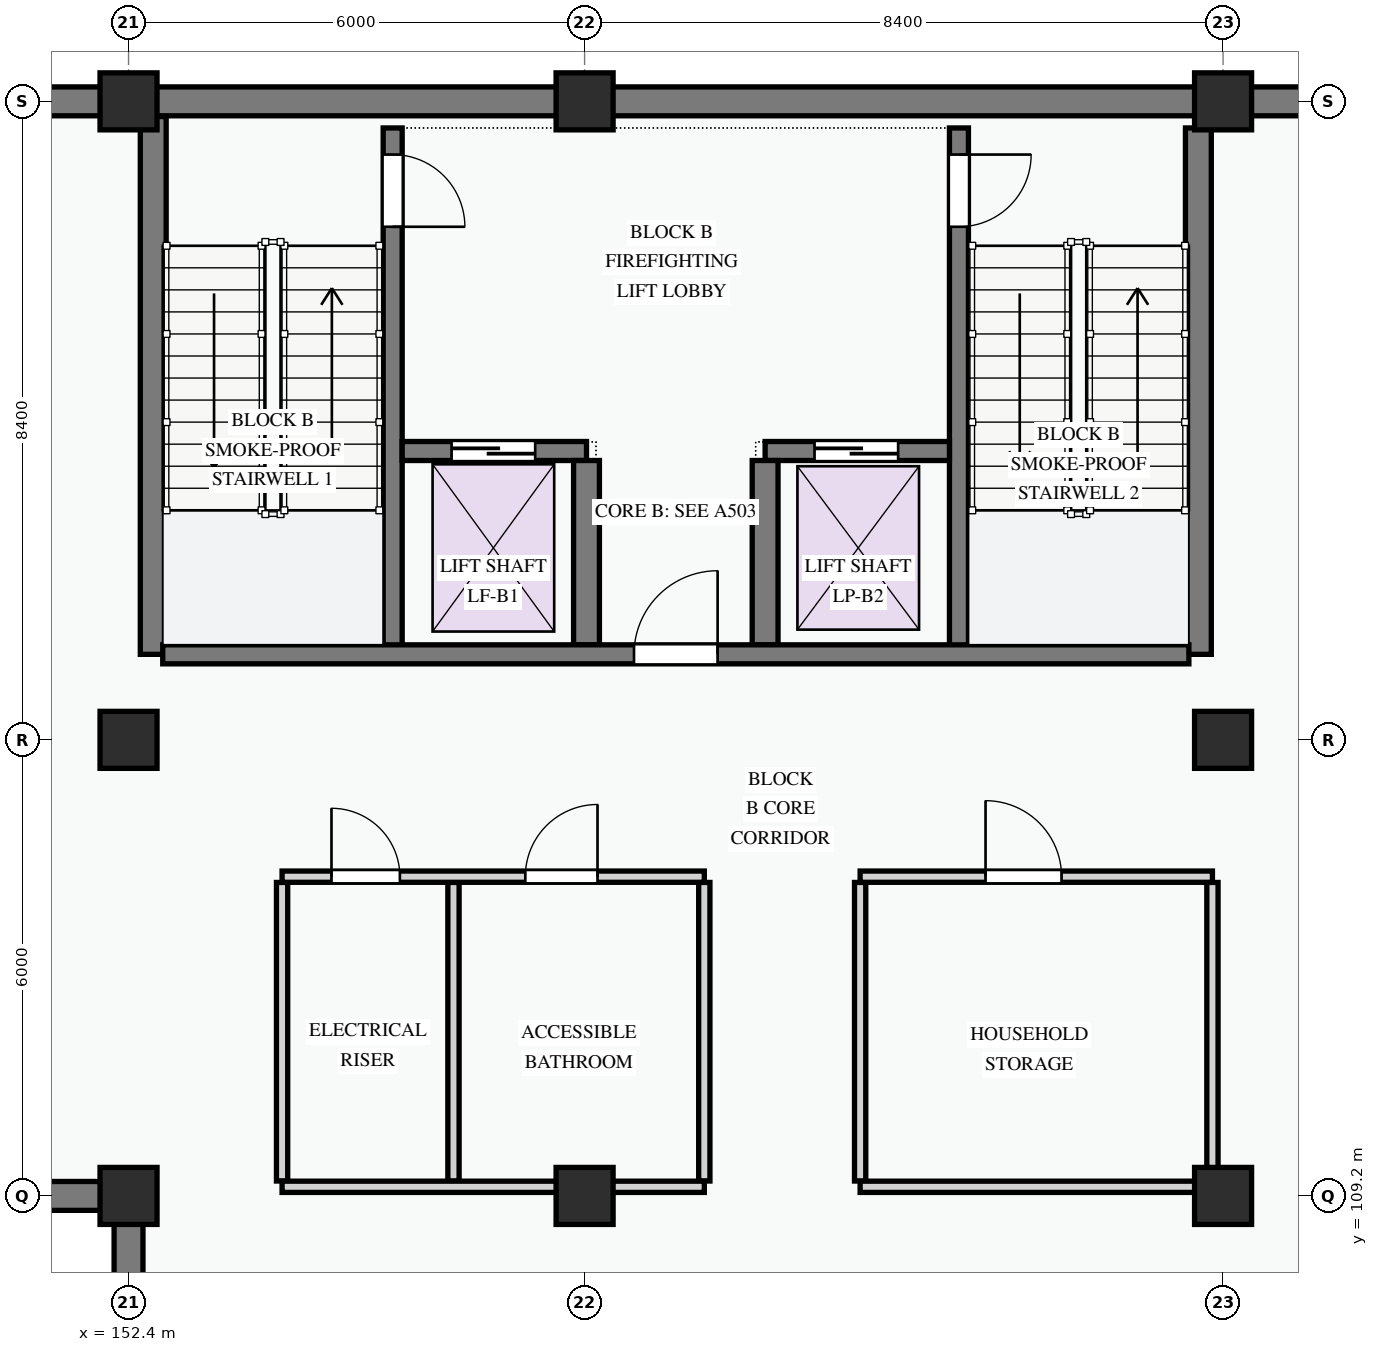
"""IFC4 building model, lengths in metres.
Left out: names, types, materials, properties, quantities, classifications, styles, units other than length and angle.
Written with IfcOpenShell. Run it as: python <this file> out.ifc"""

import sys

from ifc_helpers import new_model, si_unit, direction, frame, frame_2d, origin, origin_2d, place, context, subcontext, project, spatial, rectangle, extrude, element, fill, save


model = new_model("IFC4")
c1 = context("Model", 3, precision=1e-05, world=origin(), true_north=direction((0.0, 1.0)))
c2 = subcontext(c1, "Body", "Model", "MODEL_VIEW")
j1 = project(units=[si_unit("LENGTHUNIT", "METRE"), si_unit("PLANEANGLEUNIT", "RADIAN")], contexts=[c1])
p1 = place(None, origin())
s1 = spatial("IfcSite", under=j1, at=p1, CompositionType="ELEMENT")
p2 = place(p1, origin())
s2 = spatial("IfcBuilding", under=s1, at=p2, CompositionType="ELEMENT")
p3 = place(p2, frame((0.0, 0.0, -4.2)))
s3 = spatial("IfcBuildingStorey", under=s2, at=p3, CompositionType="ELEMENT", Elevation=-4.2)
for number, where, z_axis, x_axis in (
    (1, (152.4, 109.2, -0.45), (0.0, 0.0, 1.0), (1.0, 0.0, 0.0)),
    (2, (152.4, 115.2, -0.45), (0.0, 0.0, 1.0), (1.0, 0.0, 0.0)),
    (3, (152.4, 123.6, -0.45), (0.0, 0.0, 1.0), (1.0, 0.0, 0.0)),
    (4, (158.4, 109.2, -0.45), (0.0, 0.0, 1.0), (1.0, 0.0, 0.0)),
    (5, (158.4, 123.6, -0.45), (0.0, 0.0, 1.0), (1.0, 0.0, 0.0)),
    (6, (166.8, 109.2, -0.45), (0.0, 0.0, 1.0), (1.0, 0.0, 0.0)),
    (7, (166.8, 115.2, -0.45), (0.0, 0.0, 1.0), (1.0, 0.0, 0.0)),
    (8, (166.8, 123.6, -0.45), (0.0, 0.0, 1.0), (1.0, 0.0, 0.0)),
):
    element("IfcColumn", number, at=place(p3, frame(where, z_axis=z_axis, x_axis=x_axis)), inside=s3, PredefinedType="COLUMN", context=c2, shape_type="SweptSolid", body=[
        extrude(rectangle(XDim=0.75, YDim=0.75, at=origin_2d()), origin(), (0.0, 0.0, 1.0), 4.65),
    ])
p4 = place(p3, frame((174.0, 123.6, 0.0), z_axis=(0.0, 0.0, 1.0), x_axis=(-1.0, 0.0, 0.0)))
e9 = element("IfcWall", 9, at=p4, inside=s3, PredefinedType="SHEAR", context=c2, shape_type="SweptSolid", body=[
    extrude(rectangle(XDim=93.6, YDim=0.38, at=frame_2d((46.8, 0.0))), origin(), (0.0, 0.0, 1.0), 3.9),
])
p5 = place(p3, frame((80.4, 109.2, 0.0), z_axis=(0.0, 0.0, 1.0), x_axis=(1.0, 0.0, 0.0)))
e10 = element("IfcWall", 10, at=p5, inside=s3, PredefinedType="SHEAR", context=c2, shape_type="SweptSolid", body=[
    extrude(rectangle(XDim=72.0, YDim=0.38, at=frame_2d((36.0, 0.0))), origin(), (0.0, 0.0, 1.0), 3.9),
])
p6 = place(p3, frame((152.4, 109.2, 0.0), z_axis=(0.0, 0.0, 1.0), x_axis=(0.0, -1.0, 0.0)))
e11 = element("IfcWall", 11, at=p6, inside=s3, PredefinedType="SHEAR", context=c2, shape_type="SweptSolid", body=[
    extrude(rectangle(XDim=28.8, YDim=0.38, at=frame_2d((14.4, 0.0))), origin(), (0.0, 0.0, 1.0), 3.9),
])
p7 = place(p3, frame((155.875, 123.25, 0.0), z_axis=(0.0, 0.0, 1.0), x_axis=(0.0, -1.0, 0.0)))
e12 = element("IfcWall", 12, at=p7, inside=s3, PredefinedType="SHEAR", context=c2, shape_type="SweptSolid", body=[
    extrude(rectangle(XDim=6.925, YDim=0.25, at=frame_2d((3.462, 0.0))), origin(), (0.0, 0.0, 1.0), 3.9),
])
p8 = place(p7, frame((0.35, 0.0, 0.0)))
e13 = element("IfcOpeningElement", 13, at=p8, cuts=e12, PredefinedType="OPENING", context=c2, shape_type="SweptSolid", body=[
    extrude(rectangle(XDim=0.95, YDim=2.1, at=frame_2d((0.475, 1.05))), frame((0.0, 0.135, 0.0), z_axis=(0.0, -1.0, 0.0), x_axis=(1.0, 0.0, 0.0)), (0.0, 0.0, 1.0), 0.27),
])
p9 = place(p3, frame((152.725, 123.4, 0.0), z_axis=(0.0, 0.0, 1.0), x_axis=(0.0, -1.0, 0.0)))
e14 = element("IfcWall", 14, at=p9, inside=s3, PredefinedType="SHEAR", context=c2, shape_type="SweptSolid", body=[
    extrude(rectangle(XDim=7.075, YDim=0.34, at=frame_2d((3.538, 0.0))), origin(), (0.0, 0.0, 1.0), 3.9),
])
p10 = place(p3, frame((166.475, 123.25, 0.0), z_axis=(0.0, 0.0, 1.0), x_axis=(0.0, -1.0, 0.0)))
e15 = element("IfcWall", 15, at=p10, inside=s3, PredefinedType="SHEAR", context=c2, shape_type="SweptSolid", body=[
    extrude(rectangle(XDim=6.925, YDim=0.34, at=frame_2d((3.462, 0.0))), origin(), (0.0, 0.0, 1.0), 3.9),
])
p11 = place(p3, frame((163.325, 123.25, 0.0), z_axis=(0.0, 0.0, 1.0), x_axis=(0.0, -1.0, 0.0)))
e16 = element("IfcWall", 16, at=p11, inside=s3, PredefinedType="SHEAR", context=c2, shape_type="SweptSolid", body=[
    extrude(rectangle(XDim=6.925, YDim=0.25, at=frame_2d((3.462, 0.0))), origin(), (0.0, 0.0, 1.0), 3.9),
])
p12 = place(p11, frame((0.35, 0.0, 0.0)))
e17 = element("IfcOpeningElement", 17, at=p12, cuts=e16, PredefinedType="OPENING", context=c2, shape_type="SweptSolid", body=[
    extrude(rectangle(XDim=0.95, YDim=2.1, at=frame_2d((0.475, 1.05))), frame((0.0, 0.135, 0.0), z_axis=(0.0, -1.0, 0.0), x_axis=(1.0, 0.0, 0.0)), (0.0, 0.0, 1.0), 0.27),
])
p13 = place(p3, frame((156.0, 119.0, 0.0), z_axis=(0.0, 0.0, 1.0), x_axis=(1.0, 0.0, 0.0)))
e18 = element("IfcWall", 18, at=p13, inside=s3, PredefinedType="SHEAR", context=c2, shape_type="SweptSolid", body=[
    extrude(rectangle(XDim=2.425, YDim=0.25, at=frame_2d((1.212, 0.0))), origin(), (0.0, 0.0, 1.0), 3.9),
])
p14 = place(p13, frame((0.65, 0.0, 0.0)))
e19 = element("IfcOpeningElement", 19, at=p14, cuts=e18, PredefinedType="OPENING", context=c2, shape_type="SweptSolid", body=[
    extrude(rectangle(XDim=1.1, YDim=2.15, at=frame_2d((0.55, 1.075))), frame((0.0, 0.135, 0.0), z_axis=(0.0, -1.0, 0.0), x_axis=(1.0, 0.0, 0.0)), (0.0, 0.0, 1.0), 0.27),
])
p15 = place(p3, frame((160.775, 119.0, 0.0), z_axis=(0.0, 0.0, 1.0), x_axis=(1.0, 0.0, 0.0)))
e20 = element("IfcWall", 20, at=p15, inside=s3, PredefinedType="SHEAR", context=c2, shape_type="SweptSolid", body=[
    extrude(rectangle(XDim=2.425, YDim=0.25, at=frame_2d((1.212, 0.0))), origin(), (0.0, 0.0, 1.0), 3.9),
])
p16 = place(p15, frame((0.65, 0.0, 0.0)))
e21 = element("IfcOpeningElement", 21, at=p16, cuts=e20, PredefinedType="OPENING", context=c2, shape_type="SweptSolid", body=[
    extrude(rectangle(XDim=1.1, YDim=2.15, at=frame_2d((0.55, 1.075))), frame((0.0, 0.135, 0.0), z_axis=(0.0, -1.0, 0.0), x_axis=(1.0, 0.0, 0.0)), (0.0, 0.0, 1.0), 0.27),
])
for number, where, z_axis, x_axis in (
    (22, (158.425, 118.875, 0.0), (0.0, 0.0, 1.0), (0.0, -1.0, 0.0)),
    (23, (160.775, 118.875, 0.0), (0.0, 0.0, 1.0), (0.0, -1.0, 0.0)),
):
    element("IfcWall", number, at=place(p3, frame(where, z_axis=z_axis, x_axis=x_axis)), inside=s3, PredefinedType="SHEAR", context=c2, shape_type="SweptSolid", body=[
        extrude(rectangle(XDim=2.425, YDim=0.34, at=frame_2d((1.212, 0.0))), origin(), (0.0, 0.0, 1.0), 3.9),
    ])
p17 = place(p3, frame((152.85, 116.325, 0.0), z_axis=(0.0, 0.0, 1.0), x_axis=(1.0, 0.0, 0.0)))
e24 = element("IfcWall", 24, at=p17, inside=s3, PredefinedType="SHEAR", context=c2, shape_type="SweptSolid", body=[
    extrude(rectangle(XDim=13.5, YDim=0.25, at=frame_2d((6.75, 0.0))), origin(), (0.0, 0.0, 1.0), 3.9),
])
p18 = place(p17, frame((6.2, 0.0, 0.0)))
e25 = element("IfcOpeningElement", 25, at=p18, cuts=e24, PredefinedType="OPENING", context=c2, shape_type="SweptSolid", body=[
    extrude(rectangle(XDim=1.1, YDim=2.15, at=frame_2d((0.55, 1.075))), frame((0.0, 0.135, 0.0), z_axis=(0.0, -1.0, 0.0), x_axis=(1.0, 0.0, 0.0)), (0.0, 0.0, 1.0), 0.27),
])
for number, where, z_axis, x_axis in (
    (26, (154.42, 113.324, 0.0), (0.0, 0.0, 1.0), (0.0, -1.0, 0.0)),
    (27, (156.675, 113.324, 0.0), (0.0, 0.0, 1.0), (0.0, -1.0, 0.0)),
    (28, (159.975, 113.324, 0.0), (0.0, 0.0, 1.0), (0.0, -1.0, 0.0)),
    (29, (162.025, 113.324, 0.0), (0.0, 0.0, 1.0), (0.0, -1.0, 0.0)),
):
    element("IfcWall", number, at=place(p3, frame(where, z_axis=z_axis, x_axis=x_axis)), inside=s3, PredefinedType="PARTITIONING", context=c2, shape_type="SweptSolid", body=[
        extrude(rectangle(XDim=3.928, YDim=0.148, at=frame_2d((1.964, 0.0))), origin(), (0.0, 0.0, 1.0), 3.9),
    ])
p19 = place(p3, frame((166.66, 113.324, 0.0), z_axis=(0.0, 0.0, 1.0), x_axis=(0.0, -1.0, 0.0)))
e30 = element("IfcWall", 30, at=p19, inside=s3, PredefinedType="PARTITIONING", context=c2, shape_type="SweptSolid", body=[
    extrude(rectangle(XDim=3.928, YDim=0.148, at=frame_2d((1.964, 0.0))), origin(), (0.0, 0.0, 1.0), 3.285),
])
p20 = place(p3, frame((154.42, 113.4, 0.0), z_axis=(0.0, 0.0, 1.0), x_axis=(1.0, 0.0, 0.0)))
e31 = element("IfcWall", 31, at=p20, inside=s3, PredefinedType="PARTITIONING", context=c2, shape_type="SweptSolid", body=[
    extrude(rectangle(XDim=5.555, YDim=0.148, at=frame_2d((2.778, 0.0))), origin(), (0.0, 0.0, 1.0), 3.9),
])
p21 = place(p20, frame((0.65, 0.0, 0.0)))
e32 = element("IfcOpeningElement", 32, at=p21, cuts=e31, PredefinedType="OPENING", context=c2, shape_type="SweptSolid", body=[
    extrude(rectangle(XDim=0.9, YDim=2.1, at=frame_2d((0.45, 1.05))), frame((0.0, 0.084, 0.0), z_axis=(0.0, -1.0, 0.0), x_axis=(1.0, 0.0, 0.0)), (0.0, 0.0, 1.0), 0.168),
])
p22 = place(p20, frame((3.2, 0.0, 0.0)))
e33 = element("IfcOpeningElement", 33, at=p22, cuts=e31, PredefinedType="OPENING", context=c2, shape_type="SweptSolid", body=[
    extrude(rectangle(XDim=0.95, YDim=2.1, at=frame_2d((0.475, 1.05))), frame((0.0, 0.084, 0.0), z_axis=(0.0, -1.0, 0.0), x_axis=(1.0, 0.0, 0.0)), (0.0, 0.0, 1.0), 0.168),
])
p23 = place(p3, frame((162.025, 113.4, 0.0), z_axis=(0.0, 0.0, 1.0), x_axis=(1.0, 0.0, 0.0)))
e34 = element("IfcWall", 34, at=p23, inside=s3, PredefinedType="PARTITIONING", context=c2, shape_type="SweptSolid", body=[
    extrude(rectangle(XDim=4.635, YDim=0.148, at=frame_2d((2.317, 0.0))), origin(), (0.0, 0.0, 1.0), 3.9),
])
p24 = place(p23, frame((1.65, 0.0, 0.0)))
e35 = element("IfcOpeningElement", 35, at=p24, cuts=e34, PredefinedType="OPENING", context=c2, shape_type="SweptSolid", body=[
    extrude(rectangle(XDim=1.0, YDim=2.15, at=frame_2d((0.5, 1.075))), frame((0.0, 0.084, 0.0), z_axis=(0.0, -1.0, 0.0), x_axis=(1.0, 0.0, 0.0)), (0.0, 0.0, 1.0), 0.168),
])
p25 = place(p3, frame((154.42, 109.32, 0.0), z_axis=(0.0, 0.0, 1.0), x_axis=(1.0, 0.0, 0.0)))
e36 = element("IfcWall", 36, at=p25, inside=s3, PredefinedType="PARTITIONING", context=c2, shape_type="SweptSolid", body=[
    extrude(rectangle(XDim=5.555, YDim=0.148, at=frame_2d((2.778, 0.0))), origin(), (0.0, 0.0, 1.0), 3.185),
])
p26 = place(p3, frame((162.025, 109.32, 0.0), z_axis=(0.0, 0.0, 1.0), x_axis=(1.0, 0.0, 0.0)))
e37 = element("IfcWall", 37, at=p26, inside=s3, PredefinedType="PARTITIONING", context=c2, shape_type="SweptSolid", body=[
    extrude(rectangle(XDim=4.635, YDim=0.148, at=frame_2d((2.317, 0.0))), origin(), (0.0, 0.0, 1.0), 3.185),
])
p27 = place(p8, origin())
e38 = element("IfcDoor", 38, at=p27, inside=s3, OperationType="SINGLE_SWING_RIGHT", PredefinedType="DOOR", context=c2, shape_type="SweptSolid", body=[
    extrude(rectangle(XDim=0.95, YDim=2.1, at=frame_2d((0.475, 1.05))), frame((0.0, 0.025, 0.0), z_axis=(0.0, -1.0, 0.0), x_axis=(1.0, 0.0, 0.0)), (0.0, 0.0, 1.0), 0.05),
])
fill(e13, e38)
p28 = place(p12, origin())
e39 = element("IfcDoor", 39, at=p28, inside=s3, OperationType="SINGLE_SWING_LEFT", PredefinedType="DOOR", context=c2, shape_type="SweptSolid", body=[
    extrude(rectangle(XDim=0.95, YDim=2.1, at=frame_2d((0.475, 1.05))), frame((0.0, 0.025, 0.0), z_axis=(0.0, -1.0, 0.0), x_axis=(1.0, 0.0, 0.0)), (0.0, 0.0, 1.0), 0.05),
])
fill(e17, e39)
p29 = place(p14, origin())
e40 = element("IfcDoor", 40, at=p29, inside=s3, OperationType="SLIDING_TO_LEFT", PredefinedType="DOOR", context=c2, shape_type="SweptSolid", body=[
    extrude(rectangle(XDim=1.1, YDim=2.15, at=frame_2d((0.55, 1.075))), frame((0.0, 0.025, 0.0), z_axis=(0.0, -1.0, 0.0), x_axis=(1.0, 0.0, 0.0)), (0.0, 0.0, 1.0), 0.05),
])
fill(e19, e40)
p30 = place(p16, origin())
e41 = element("IfcDoor", 41, at=p30, inside=s3, OperationType="SLIDING_TO_LEFT", PredefinedType="DOOR", context=c2, shape_type="SweptSolid", body=[
    extrude(rectangle(XDim=1.1, YDim=2.15, at=frame_2d((0.55, 1.075))), frame((0.0, 0.025, 0.0), z_axis=(0.0, -1.0, 0.0), x_axis=(1.0, 0.0, 0.0)), (0.0, 0.0, 1.0), 0.05),
])
fill(e21, e41)
p31 = place(p18, origin())
e42 = element("IfcDoor", 42, at=p31, inside=s3, OperationType="SINGLE_SWING_RIGHT", PredefinedType="DOOR", context=c2, shape_type="SweptSolid", body=[
    extrude(rectangle(XDim=1.1, YDim=2.15, at=frame_2d((0.55, 1.075))), frame((0.0, 0.025, 0.0), z_axis=(0.0, -1.0, 0.0), x_axis=(1.0, 0.0, 0.0)), (0.0, 0.0, 1.0), 0.05),
])
fill(e25, e42)
p32 = place(p21, origin())
e43 = element("IfcDoor", 43, at=p32, inside=s3, OperationType="SINGLE_SWING_LEFT", PredefinedType="DOOR", context=c2, shape_type="SweptSolid", body=[
    extrude(rectangle(XDim=0.9, YDim=2.1, at=frame_2d((0.45, 1.05))), frame((0.0, 0.025, 0.0), z_axis=(0.0, -1.0, 0.0), x_axis=(1.0, 0.0, 0.0)), (0.0, 0.0, 1.0), 0.05),
])
fill(e32, e43)
p33 = place(p22, origin())
e44 = element("IfcDoor", 44, at=p33, inside=s3, OperationType="SINGLE_SWING_RIGHT", PredefinedType="DOOR", context=c2, shape_type="SweptSolid", body=[
    extrude(rectangle(XDim=0.95, YDim=2.1, at=frame_2d((0.475, 1.05))), frame((0.0, 0.025, 0.0), z_axis=(0.0, -1.0, 0.0), x_axis=(1.0, 0.0, 0.0)), (0.0, 0.0, 1.0), 0.05),
])
fill(e33, e44)
p34 = place(p24, origin())
e45 = element("IfcDoor", 45, at=p34, inside=s3, OperationType="SINGLE_SWING_LEFT", PredefinedType="DOOR", context=c2, shape_type="SweptSolid", body=[
    extrude(rectangle(XDim=1.0, YDim=2.15, at=frame_2d((0.5, 1.075))), frame((0.0, 0.025, 0.0), z_axis=(0.0, -1.0, 0.0), x_axis=(1.0, 0.0, 0.0)), (0.0, 0.0, 1.0), 0.05),
])
fill(e35, e45)
save(model, sys.argv[1])
